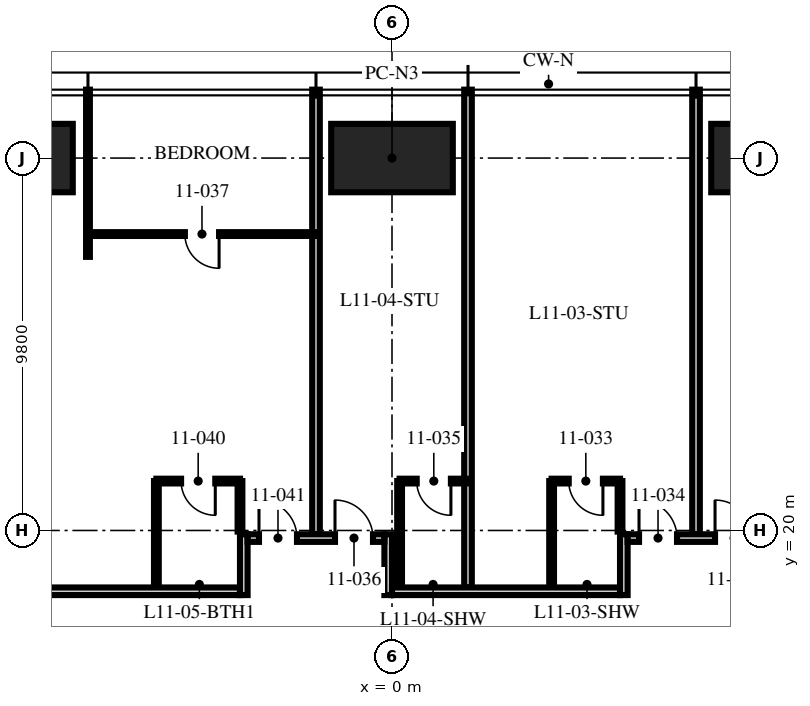
"""IFC4 building model, lengths in metres.
Left out: names, types, materials, properties, quantities, classifications, styles, units other than length and angle.
Written with IfcOpenShell. Run it as: python <this file> out.ifc"""

import sys

from ifc_helpers import new_model, si_unit, direction, frame, frame_2d, origin, origin_2d, place, context, subcontext, project, spatial, rectangle, hollow_rectangle, extrude, element, fill, save


model = new_model("IFC4")
c1 = context("Model", 3, precision=1e-05, world=origin(), true_north=direction((0.0, 1.0)))
c2 = subcontext(c1, "Body", "Model", "MODEL_VIEW")
j1 = project(units=[si_unit("LENGTHUNIT", "METRE"), si_unit("PLANEANGLEUNIT", "RADIAN")], contexts=[c1])
p1 = place(None, origin())
s1 = spatial("IfcSite", under=j1, at=p1, CompositionType="ELEMENT")
p2 = place(p1, origin())
s2 = spatial("IfcBuilding", under=s1, at=p2, CompositionType="ELEMENT")
p3 = place(p2, frame((0.0, 0.0, 47.25)))
s3 = spatial("IfcBuildingStorey", under=s2, at=p3, CompositionType="ELEMENT", Elevation=47.25)
for number, where, z_axis, x_axis in (
    (1, (-10.0, 29.8, 0.0), (0.0, 0.0, 1.0), (1.0, 0.0, 0.0)),
    (2, (0.0, 29.8, 0.0), (0.0, 0.0, 1.0), (1.0, 0.0, 0.0)),
    (3, (10.0, 29.8, 0.0), (0.0, 0.0, 1.0), (1.0, 0.0, 0.0)),
):
    element("IfcColumn", number, at=place(p3, frame(where, z_axis=z_axis, x_axis=x_axis)), inside=s3, PredefinedType="COLUMN", context=c2, shape_type="SweptSolid", body=[
        extrude(hollow_rectangle(XDim=3.2, YDim=1.8, WallThickness=0.2, at=origin_2d()), origin(), (0.0, 0.0, 1.0), 3.75),
    ])
p4 = place(p3, frame((8.0, 19.9, 0.0), z_axis=(0.0, 0.0, 1.0), x_axis=(0.0, 1.0, 0.0)))
e4 = element("IfcWall", 4, at=p4, inside=s3, PredefinedType="PARTITIONING", context=c2, shape_type="SweptSolid", body=[
    extrude(rectangle(XDim=11.7, YDim=0.2, at=frame_2d((5.85, 0.0))), origin(), (0.0, 0.0, 1.0), 2.71),
])
p5 = place(p3, frame((2.0, 18.5, 0.0), z_axis=(0.0, 0.0, 1.0), x_axis=(0.0, 1.0, 0.0)))
e5 = element("IfcWall", 5, at=p5, inside=s3, PredefinedType="PARTITIONING", context=c2, shape_type="SweptSolid", body=[
    extrude(rectangle(XDim=13.1, YDim=0.2, at=frame_2d((6.55, 0.0))), origin(), (0.0, 0.0, 1.0), 2.71),
])
p6 = place(p3, frame((-2.0, 19.9, 0.0), z_axis=(0.0, 0.0, 1.0), x_axis=(0.0, 1.0, 0.0)))
e6 = element("IfcWall", 6, at=p6, inside=s3, PredefinedType="PARTITIONING", context=c2, shape_type="SweptSolid", body=[
    extrude(rectangle(XDim=11.7, YDim=0.2, at=frame_2d((5.85, 0.0))), origin(), (0.0, 0.0, 1.0), 2.71),
])
p7 = place(p3, frame((-8.0, 27.2, 0.0), z_axis=(0.0, 0.0, 1.0), x_axis=(0.0, 1.0, 0.0)))
e7 = element("IfcWall", 7, at=p7, inside=s3, PredefinedType="PARTITIONING", context=c2, shape_type="SweptSolid", body=[
    extrude(rectangle(XDim=4.4, YDim=0.1, at=frame_2d((2.2, 0.0))), origin(), (0.0, 0.0, 1.0), 2.71),
])
p8 = place(p3, frame((6.0, 21.3, 0.0), z_axis=(0.0, 0.0, 1.0), x_axis=(-1.0, 0.0, 0.0)))
e8 = element("IfcWall", 8, at=p8, inside=s3, PredefinedType="PARTITIONING", context=c2, shape_type="SweptSolid", body=[
    extrude(rectangle(XDim=1.8, YDim=0.125, at=frame_2d((0.9, 0.0))), origin(), (0.0, 0.0, 1.0), 2.61),
])
p9 = place(p8, frame((0.45, 0.0, 0.0)))
e9 = element("IfcOpeningElement", 9, at=p9, cuts=e8, PredefinedType="OPENING", context=c2, shape_type="SweptSolid", body=[
    extrude(rectangle(XDim=0.9, YDim=2.1, at=frame_2d((0.45, 1.05))), frame((0.0, 0.073, 0.0), z_axis=(0.0, -1.0, 0.0), x_axis=(1.0, 0.0, 0.0)), (0.0, 0.0, 1.0), 0.145),
])
p10 = place(p3, frame((6.0, 19.97, 0.0), z_axis=(0.0, 0.0, 1.0), x_axis=(0.0, 1.0, 0.0)))
e10 = element("IfcWall", 10, at=p10, inside=s3, PredefinedType="PARTITIONING", context=c2, shape_type="SweptSolid", body=[
    extrude(rectangle(XDim=1.33, YDim=0.125, at=frame_2d((0.665, 0.0))), origin(), (0.0, 0.0, 1.0), 3.5),
])
p11 = place(p3, frame((4.2, 18.5, 0.0), z_axis=(0.0, 0.0, 1.0), x_axis=(0.0, 1.0, 0.0)))
e11 = element("IfcWall", 11, at=p11, inside=s3, PredefinedType="PARTITIONING", context=c2, shape_type="SweptSolid", body=[
    extrude(rectangle(XDim=2.8, YDim=0.125, at=frame_2d((1.4, 0.0))), origin(), (0.0, 0.0, 1.0), 3.5),
])
p12 = place(p3, frame((2.0, 21.3, 0.0), z_axis=(0.0, 0.0, 1.0), x_axis=(-1.0, 0.0, 0.0)))
e12 = element("IfcWall", 12, at=p12, inside=s3, PredefinedType="PARTITIONING", context=c2, shape_type="SweptSolid", body=[
    extrude(rectangle(XDim=1.8, YDim=0.125, at=frame_2d((0.9, 0.0))), origin(), (0.0, 0.0, 1.0), 3.5),
])
p13 = place(p12, frame((0.45, 0.0, 0.0)))
e13 = element("IfcOpeningElement", 13, at=p13, cuts=e12, PredefinedType="OPENING", context=c2, shape_type="SweptSolid", body=[
    extrude(rectangle(XDim=0.9, YDim=2.1, at=frame_2d((0.45, 1.05))), frame((0.0, 0.073, 0.0), z_axis=(0.0, -1.0, 0.0), x_axis=(1.0, 0.0, 0.0)), (0.0, 0.0, 1.0), 0.145),
])
p14 = place(p3, frame((0.2, 18.5, 0.0), z_axis=(0.0, 0.0, 1.0), x_axis=(0.0, 1.0, 0.0)))
e14 = element("IfcWall", 14, at=p14, inside=s3, PredefinedType="PARTITIONING", context=c2, shape_type="SweptSolid", body=[
    extrude(rectangle(XDim=2.8, YDim=0.125, at=frame_2d((1.4, 0.0))), origin(), (0.0, 0.0, 1.0), 2.492),
])
p15 = place(p3, frame((-2.0, 27.8, 0.0), z_axis=(0.0, 0.0, 1.0), x_axis=(-1.0, 0.0, 0.0)))
e15 = element("IfcWall", 15, at=p15, inside=s3, PredefinedType="PARTITIONING", context=c2, shape_type="SweptSolid", body=[
    extrude(rectangle(XDim=6.0, YDim=0.1, at=frame_2d((3.0, 0.0))), origin(), (0.0, 0.0, 1.0), 2.61),
])
p16 = place(p15, frame((2.55, 0.0, 0.0)))
e16 = element("IfcOpeningElement", 16, at=p16, cuts=e15, PredefinedType="OPENING", context=c2, shape_type="SweptSolid", body=[
    extrude(rectangle(XDim=0.9, YDim=2.1, at=frame_2d((0.45, 1.05))), frame((0.0, 0.06, 0.0), z_axis=(0.0, -1.0, 0.0), x_axis=(1.0, 0.0, 0.0)), (0.0, 0.0, 1.0), 0.12),
])
p17 = place(p3, frame((-4.0, 21.3, 0.0), z_axis=(0.0, 0.0, 1.0), x_axis=(-1.0, 0.0, 0.0)))
e17 = element("IfcWall", 17, at=p17, inside=s3, PredefinedType="PARTITIONING", context=c2, shape_type="SweptSolid", body=[
    extrude(rectangle(XDim=2.2, YDim=0.125, at=frame_2d((1.1, 0.0))), origin(), (0.0, 0.0, 1.0), 2.61),
])
p18 = place(p17, frame((0.65, 0.0, 0.0)))
e18 = element("IfcOpeningElement", 18, at=p18, cuts=e17, PredefinedType="OPENING", context=c2, shape_type="SweptSolid", body=[
    extrude(rectangle(XDim=0.9, YDim=2.1, at=frame_2d((0.45, 1.05))), frame((0.0, 0.073, 0.0), z_axis=(0.0, -1.0, 0.0), x_axis=(1.0, 0.0, 0.0)), (0.0, 0.0, 1.0), 0.145),
])
p19 = place(p3, frame((-4.0, 19.97, 0.0), z_axis=(0.0, 0.0, 1.0), x_axis=(0.0, 1.0, 0.0)))
e19 = element("IfcWall", 19, at=p19, inside=s3, PredefinedType="PARTITIONING", context=c2, shape_type="SweptSolid", body=[
    extrude(rectangle(XDim=1.33, YDim=0.125, at=frame_2d((0.665, 0.0))), origin(), (0.0, 0.0, 1.0), 3.5),
])
p20 = place(p3, frame((-6.2, 18.5, 0.0), z_axis=(0.0, 0.0, 1.0), x_axis=(0.0, 1.0, 0.0)))
e20 = element("IfcWall", 20, at=p20, inside=s3, PredefinedType="PARTITIONING", context=c2, shape_type="SweptSolid", body=[
    extrude(rectangle(XDim=2.8, YDim=0.125, at=frame_2d((1.4, 0.0))), origin(), (0.0, 0.0, 1.0), 3.5),
])
p21 = place(p3, frame((-18.5, 18.4, 0.0), z_axis=(0.0, 0.0, 1.0), x_axis=(1.0, 0.0, 0.0)))
e21 = element("IfcWall", 21, at=p21, inside=s3, PredefinedType="PARTITIONING", context=c2, shape_type="SweptSolid", body=[
    extrude(rectangle(XDim=14.5, YDim=0.2, at=frame_2d((7.25, 0.0))), origin(), (0.0, 0.0, 1.0), 2.3),
])
p22 = place(p3, frame((-3.9, 18.3, 0.0), z_axis=(0.0, 0.0, 1.0), x_axis=(0.0, 1.0, 0.0)))
e22 = element("IfcWall", 22, at=p22, inside=s3, PredefinedType="PARTITIONING", context=c2, shape_type="SweptSolid", body=[
    extrude(rectangle(XDim=1.6, YDim=0.2, at=frame_2d((0.8, 0.0))), origin(), (0.0, 0.0, 1.0), 3.5),
])
p23 = place(p3, frame((-0.1, 18.3, 0.0), z_axis=(0.0, 0.0, 1.0), x_axis=(0.0, 1.0, 0.0)))
e23 = element("IfcWall", 23, at=p23, inside=s3, PredefinedType="PARTITIONING", context=c2, shape_type="SweptSolid", body=[
    extrude(rectangle(XDim=1.6, YDim=0.2, at=frame_2d((0.8, 0.0))), origin(), (0.0, 0.0, 1.0), 2.492),
])
p24 = place(p3, frame((-3.8, 19.8, 0.0), z_axis=(0.0, 0.0, 1.0), x_axis=(1.0, 0.0, 0.0)))
e24 = element("IfcWall", 24, at=p24, inside=s3, PredefinedType="PARTITIONING", context=c2, shape_type="SweptSolid", body=[
    extrude(rectangle(XDim=3.6, YDim=0.2, at=frame_2d((1.8, 0.0))), origin(), (0.0, 0.0, 1.0), 3.5),
])
p25 = place(p24, frame((2.3, 0.0, 0.0)))
e25 = element("IfcOpeningElement", 25, at=p25, cuts=e24, PredefinedType="OPENING", context=c2, shape_type="SweptSolid", body=[
    extrude(rectangle(XDim=1.0, YDim=2.2, at=frame_2d((0.5, 1.1))), frame((0.0, 0.11, 0.0), z_axis=(0.0, -1.0, 0.0), x_axis=(1.0, 0.0, 0.0)), (0.0, 0.0, 1.0), 0.22),
])
p26 = place(p24, frame((0.3, 0.0, 0.0)))
e26 = element("IfcOpeningElement", 26, at=p26, cuts=e24, PredefinedType="OPENING", context=c2, shape_type="SweptSolid", body=[
    extrude(rectangle(XDim=1.0, YDim=2.2, at=frame_2d((0.5, 1.1))), frame((0.0, 0.11, 0.0), z_axis=(0.0, -1.0, 0.0), x_axis=(1.0, 0.0, 0.0)), (0.0, 0.0, 1.0), 0.22),
])
p27 = place(p3, frame((0.0, 18.4, 0.0), z_axis=(0.0, 0.0, 1.0), x_axis=(1.0, 0.0, 0.0)))
e27 = element("IfcWall", 27, at=p27, inside=s3, PredefinedType="PARTITIONING", context=c2, shape_type="SweptSolid", body=[
    extrude(rectangle(XDim=6.0, YDim=0.2, at=frame_2d((3.0, 0.0))), origin(), (0.0, 0.0, 1.0), 2.492),
])
p28 = place(p3, frame((6.1, 18.3, 0.0), z_axis=(0.0, 0.0, 1.0), x_axis=(0.0, 1.0, 0.0)))
e28 = element("IfcWall", 28, at=p28, inside=s3, PredefinedType="PARTITIONING", context=c2, shape_type="SweptSolid", body=[
    extrude(rectangle(XDim=1.6, YDim=0.2, at=frame_2d((0.8, 0.0))), origin(), (0.0, 0.0, 1.0), 3.5),
])
p29 = place(p3, frame((6.2, 19.8, 0.0), z_axis=(0.0, 0.0, 1.0), x_axis=(1.0, 0.0, 0.0)))
e29 = element("IfcWall", 29, at=p29, inside=s3, PredefinedType="PARTITIONING", context=c2, shape_type="SweptSolid", body=[
    extrude(rectangle(XDim=3.6, YDim=0.2, at=frame_2d((1.8, 0.0))), origin(), (0.0, 0.0, 1.0), 3.5),
])
p30 = place(p29, frame((2.3, 0.0, 0.0)))
e30 = element("IfcOpeningElement", 30, at=p30, cuts=e29, PredefinedType="OPENING", context=c2, shape_type="SweptSolid", body=[
    extrude(rectangle(XDim=1.0, YDim=2.2, at=frame_2d((0.5, 1.1))), frame((0.0, 0.11, 0.0), z_axis=(0.0, -1.0, 0.0), x_axis=(1.0, 0.0, 0.0)), (0.0, 0.0, 1.0), 0.22),
])
p31 = place(p29, frame((0.3, 0.0, 0.0)))
e31 = element("IfcOpeningElement", 31, at=p31, cuts=e29, PredefinedType="OPENING", context=c2, shape_type="SweptSolid", body=[
    extrude(rectangle(XDim=1.0, YDim=2.2, at=frame_2d((0.5, 1.1))), frame((0.0, 0.11, 0.0), z_axis=(0.0, -1.0, 0.0), x_axis=(1.0, 0.0, 0.0)), (0.0, 0.0, 1.0), 0.22),
])
p32 = place(p30, origin())
e32 = element("IfcDoor", 32, at=p32, inside=s3, OperationType="SINGLE_SWING_LEFT", PredefinedType="DOOR", context=c2, shape_type="SweptSolid", body=[
    extrude(rectangle(XDim=1.0, YDim=2.2, at=frame_2d((0.5, 1.1))), frame((0.0, 0.025, 0.0), z_axis=(0.0, -1.0, 0.0), x_axis=(1.0, 0.0, 0.0)), (0.0, 0.0, 1.0), 0.05),
])
fill(e30, e32)
p33 = place(p9, origin())
e33 = element("IfcDoor", 33, at=p33, inside=s3, OperationType="SINGLE_SWING_LEFT", PredefinedType="DOOR", context=c2, shape_type="SweptSolid", body=[
    extrude(rectangle(XDim=0.9, YDim=2.1, at=frame_2d((0.45, 1.05))), frame((0.0, 0.025, 0.0), z_axis=(0.0, -1.0, 0.0), x_axis=(1.0, 0.0, 0.0)), (0.0, 0.0, 1.0), 0.05),
])
fill(e9, e33)
p34 = place(p31, origin())
e34 = element("IfcDoor", 34, at=p34, inside=s3, OperationType="SINGLE_SWING_LEFT", PredefinedType="DOOR", context=c2, shape_type="SweptSolid", body=[
    extrude(rectangle(XDim=1.0, YDim=2.2, at=frame_2d((0.5, 1.1))), frame((0.0, 0.025, 0.0), z_axis=(0.0, -1.0, 0.0), x_axis=(1.0, 0.0, 0.0)), (0.0, 0.0, 1.0), 0.05),
])
fill(e31, e34)
p35 = place(p13, origin())
e35 = element("IfcDoor", 35, at=p35, inside=s3, OperationType="SINGLE_SWING_LEFT", PredefinedType="DOOR", context=c2, shape_type="SweptSolid", body=[
    extrude(rectangle(XDim=0.9, YDim=2.1, at=frame_2d((0.45, 1.05))), frame((0.0, 0.025, 0.0), z_axis=(0.0, -1.0, 0.0), x_axis=(1.0, 0.0, 0.0)), (0.0, 0.0, 1.0), 0.05),
])
fill(e13, e35)
p36 = place(p25, origin())
e36 = element("IfcDoor", 36, at=p36, inside=s3, OperationType="SINGLE_SWING_LEFT", PredefinedType="DOOR", context=c2, shape_type="SweptSolid", body=[
    extrude(rectangle(XDim=1.0, YDim=2.2, at=frame_2d((0.5, 1.1))), frame((0.0, 0.025, 0.0), z_axis=(0.0, -1.0, 0.0), x_axis=(1.0, 0.0, 0.0)), (0.0, 0.0, 1.0), 0.05),
])
fill(e25, e36)
p37 = place(p16, origin())
e37 = element("IfcDoor", 37, at=p37, inside=s3, OperationType="SINGLE_SWING_LEFT", PredefinedType="DOOR", context=c2, shape_type="SweptSolid", body=[
    extrude(rectangle(XDim=0.9, YDim=2.1, at=frame_2d((0.45, 1.05))), frame((0.0, 0.025, 0.0), z_axis=(0.0, -1.0, 0.0), x_axis=(1.0, 0.0, 0.0)), (0.0, 0.0, 1.0), 0.05),
])
fill(e16, e37)
p38 = place(p18, origin())
e38 = element("IfcDoor", 38, at=p38, inside=s3, OperationType="SINGLE_SWING_LEFT", PredefinedType="DOOR", context=c2, shape_type="SweptSolid", body=[
    extrude(rectangle(XDim=0.9, YDim=2.1, at=frame_2d((0.45, 1.05))), frame((0.0, 0.025, 0.0), z_axis=(0.0, -1.0, 0.0), x_axis=(1.0, 0.0, 0.0)), (0.0, 0.0, 1.0), 0.05),
])
fill(e18, e38)
p39 = place(p26, origin())
e39 = element("IfcDoor", 39, at=p39, inside=s3, OperationType="SINGLE_SWING_LEFT", PredefinedType="DOOR", context=c2, shape_type="SweptSolid", body=[
    extrude(rectangle(XDim=1.0, YDim=2.2, at=frame_2d((0.5, 1.1))), frame((0.0, 0.025, 0.0), z_axis=(0.0, -1.0, 0.0), x_axis=(1.0, 0.0, 0.0)), (0.0, 0.0, 1.0), 0.05),
])
fill(e26, e39)
save(model, sys.argv[1])
